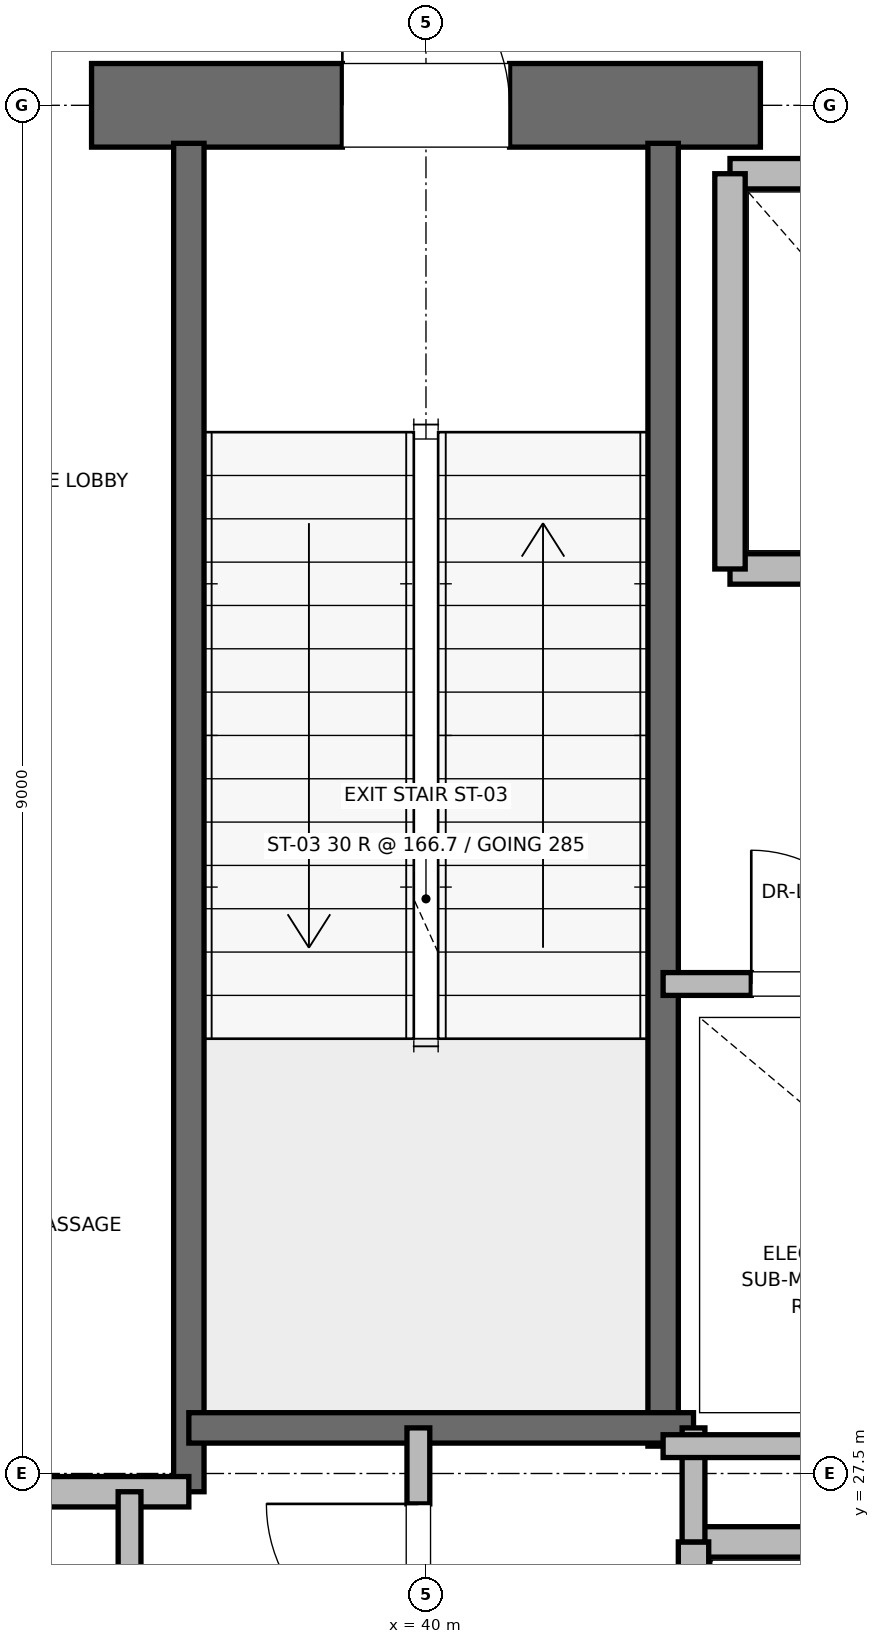
"""IFC4 building model, lengths in metres.
Left out: names, types, materials, properties, quantities, classifications, styles, units other than length and angle.
Written with IfcOpenShell. Run it as: python <this file> out.ifc"""

import sys

from ifc_helpers import new_model, si_unit, direction, frame, frame_2d, origin, place, context, subcontext, project, spatial, rectangle, extrude, element, fill, save


model = new_model("IFC4")
c1 = context("Model", 3, precision=1e-05, world=origin(), true_north=direction((0.0, 1.0)))
c2 = subcontext(c1, "Body", "Model", "MODEL_VIEW")
j1 = project(units=[si_unit("LENGTHUNIT", "METRE"), si_unit("PLANEANGLEUNIT", "RADIAN")], contexts=[c1])
p1 = place(None, origin())
s1 = spatial("IfcSite", under=j1, at=p1, CompositionType="ELEMENT")
p2 = place(p1, origin())
s2 = spatial("IfcBuilding", under=s1, at=p2, CompositionType="ELEMENT")
p3 = place(p2, frame((0.0, 0.0, 184.4)))
s3 = spatial("IfcBuildingStorey", under=s2, at=p3, CompositionType="ELEMENT", Elevation=184.4)
p4 = place(p3, frame((37.8, 36.5, 0.0), z_axis=(0.0, 0.0, 1.0), x_axis=(1.0, 0.0, 0.0)))
e1 = element("IfcWall", 1, at=p4, inside=s3, PredefinedType="SHEAR", context=c2, shape_type="SweptSolid", body=[
    extrude(rectangle(XDim=4.4, YDim=0.55, at=frame_2d((2.2, 0.0))), origin(), (0.0, 0.0, 1.0), 4.7),
])
p5 = place(p4, frame((1.65, 0.0, 0.0)))
e2 = element("IfcOpeningElement", 2, at=p5, cuts=e1, PredefinedType="OPENING", context=c2, shape_type="SweptSolid", body=[
    extrude(rectangle(XDim=1.1, YDim=2.15, at=frame_2d((0.55, 1.075))), frame((0.0, 0.275, 0.0), z_axis=(0.0, -1.0, 0.0), x_axis=(1.0, 0.0, 0.0)), (0.0, 0.0, 1.0), 0.55),
])
p6 = place(p3, frame((38.44, 27.38, 0.0), z_axis=(0.0, 0.0, 1.0), x_axis=(0.0, 1.0, 0.0)))
e3 = element("IfcWall", 3, at=p6, inside=s3, PredefinedType="SOLIDWALL", context=c2, shape_type="SweptSolid", body=[
    extrude(rectangle(XDim=8.87, YDim=0.2, at=frame_2d((4.435, 0.0))), origin(), (0.0, 0.0, 1.0), 4.7),
])
p7 = place(p3, frame((41.56, 27.68, 0.0), z_axis=(0.0, 0.0, 1.0), x_axis=(0.0, 1.0, 0.0)))
e4 = element("IfcWall", 4, at=p7, inside=s3, PredefinedType="SOLIDWALL", context=c2, shape_type="SweptSolid", body=[
    extrude(rectangle(XDim=8.57, YDim=0.2, at=frame_2d((4.285, 0.0))), origin(), (0.0, 0.0, 1.0), 4.7),
])
p8 = place(p3, frame((38.44, 27.8, 0.0), z_axis=(0.0, 0.0, 1.0), x_axis=(1.0, 0.0, 0.0)))
e5 = element("IfcWall", 5, at=p8, inside=s3, PredefinedType="SOLIDWALL", context=c2, shape_type="SweptSolid", body=[
    extrude(rectangle(XDim=3.32, YDim=0.2, at=frame_2d((1.66, 0.0))), origin(), (0.0, 0.0, 1.0), 4.7),
])
p9 = place(p3, frame((32.82, 27.38, 0.0), z_axis=(0.0, 0.0, 1.0), x_axis=(1.0, 0.0, 0.0)))
e6 = element("IfcWall", 6, at=p9, inside=s3, PredefinedType="PARTITIONING", context=c2, shape_type="SweptSolid", body=[
    extrude(rectangle(XDim=5.62, YDim=0.2, at=frame_2d((2.81, 0.0))), origin(), (0.0, 0.0, 1.0), 4.7),
])
p10 = place(p3, frame((43.44, 27.05, 0.0), z_axis=(0.0, 0.0, 1.0), x_axis=(-1.0, 0.0, 0.0)))
e7 = element("IfcWall", 7, at=p10, inside=s3, PredefinedType="SOLIDWALL", context=c2, shape_type="SweptSolid", body=[
    extrude(rectangle(XDim=1.68, YDim=0.2, at=frame_2d((0.84, 0.0))), origin(), (0.0, 0.0, 1.0), 4.7),
])
p11 = place(p3, frame((41.76, 27.05, 0.0), z_axis=(0.0, 0.0, 1.0), x_axis=(0.0, -1.0, 0.0)))
e8 = element("IfcWall", 8, at=p11, inside=s3, PredefinedType="SOLIDWALL", context=c2, shape_type="SweptSolid", body=[
    extrude(rectangle(XDim=2.6, YDim=0.2, at=frame_2d((1.3, 0.0))), origin(), (0.0, 0.0, 1.0), 4.7),
])
p12 = place(p3, frame((42.0, 33.45, 0.0), z_axis=(0.0, 0.0, 1.0), x_axis=(1.0, 0.0, 0.0)))
e9 = element("IfcWall", 9, at=p12, inside=s3, PredefinedType="SOLIDWALL", context=c2, shape_type="SweptSolid", body=[
    extrude(rectangle(XDim=2.3, YDim=0.2, at=frame_2d((1.15, 0.0))), origin(), (0.0, 0.0, 1.0), 4.7),
])
p13 = place(p3, frame((44.3, 36.05, 0.0), z_axis=(0.0, 0.0, 1.0), x_axis=(-1.0, 0.0, 0.0)))
e10 = element("IfcWall", 10, at=p13, inside=s3, PredefinedType="SOLIDWALL", context=c2, shape_type="SweptSolid", body=[
    extrude(rectangle(XDim=2.3, YDim=0.2, at=frame_2d((1.15, 0.0))), origin(), (0.0, 0.0, 1.0), 3.68),
])
p14 = place(p3, frame((42.0, 36.05, 0.0), z_axis=(0.0, 0.0, 1.0), x_axis=(0.0, -1.0, 0.0)))
e11 = element("IfcWall", 11, at=p14, inside=s3, PredefinedType="SOLIDWALL", context=c2, shape_type="SweptSolid", body=[
    extrude(rectangle(XDim=2.6, YDim=0.2, at=frame_2d((1.3, 0.0))), origin(), (0.0, 0.0, 1.0), 3.68),
])
p15 = place(p3, frame((41.76, 27.05, 0.0), z_axis=(0.0, 0.0, 1.0), x_axis=(0.0, 1.0, 0.0)))
e12 = element("IfcWall", 12, at=p15, inside=s3, PredefinedType="PARTITIONING", context=c2, shape_type="SweptSolid", body=[
    extrude(rectangle(XDim=0.75, YDim=0.15, at=frame_2d((0.375, 0.0))), origin(), (0.0, 0.0, 1.0), 2.85),
])
p16 = place(p3, frame((39.95, 25.8, 0.0), z_axis=(0.0, 0.0, 1.0), x_axis=(0.0, 1.0, 0.0)))
e13 = element("IfcWall", 13, at=p16, inside=s3, PredefinedType="PARTITIONING", context=c2, shape_type="SweptSolid", body=[
    extrude(rectangle(XDim=2.0, YDim=0.15, at=frame_2d((1.0, 0.0))), origin(), (0.0, 0.0, 1.0), 2.85),
])
p17 = place(p16, frame((0.5, 0.0, 0.0)))
e14 = element("IfcOpeningElement", 14, at=p17, cuts=e13, PredefinedType="OPENING", context=c2, shape_type="SweptSolid", body=[
    extrude(rectangle(XDim=1.0, YDim=2.15, at=frame_2d((0.5, 1.075))), frame((0.0, 0.075, 0.0), z_axis=(0.0, -1.0, 0.0), x_axis=(1.0, 0.0, 0.0)), (0.0, 0.0, 1.0), 0.15),
])
p18 = place(p3, frame((38.05, 24.5, 0.0), z_axis=(0.0, 0.0, 1.0), x_axis=(0.0, 1.0, 0.0)))
e15 = element("IfcWall", 15, at=p18, inside=s3, PredefinedType="PARTITIONING", context=c2, shape_type="SweptSolid", body=[
    extrude(rectangle(XDim=2.88, YDim=0.15, at=frame_2d((1.44, 0.0))), origin(), (0.0, 0.0, 1.0), 2.85),
])
p19 = place(p18, frame((0.94, 0.0, 0.0)))
e16 = element("IfcOpeningElement", 16, at=p19, cuts=e15, PredefinedType="OPENING", context=c2, shape_type="SweptSolid", body=[
    extrude(rectangle(XDim=1.0, YDim=2.15, at=frame_2d((0.5, 1.075))), frame((0.0, 0.075, 0.0), z_axis=(0.0, -1.0, 0.0), x_axis=(1.0, 0.0, 0.0)), (0.0, 0.0, 1.0), 0.15),
])
p20 = place(p3, frame((41.56, 27.68, 0.0), z_axis=(0.0, 0.0, 1.0), x_axis=(1.0, 0.0, 0.0)))
e17 = element("IfcWall", 17, at=p20, inside=s3, PredefinedType="PARTITIONING", context=c2, shape_type="SweptSolid", body=[
    extrude(rectangle(XDim=3.59, YDim=0.15, at=frame_2d((1.795, 0.0))), origin(), (0.0, 0.0, 1.0), 2.85),
])
p21 = place(p3, frame((41.56, 30.72, 0.0), z_axis=(0.0, 0.0, 1.0), x_axis=(1.0, 0.0, 0.0)))
e18 = element("IfcWall", 18, at=p21, inside=s3, PredefinedType="PARTITIONING", context=c2, shape_type="SweptSolid", body=[
    extrude(rectangle(XDim=2.04, YDim=0.15, at=frame_2d((1.02, 0.0))), origin(), (0.0, 0.0, 1.0), 2.85),
])
p22 = place(p21, frame((0.58, 0.0, 0.0)))
e19 = element("IfcOpeningElement", 19, at=p22, cuts=e18, PredefinedType="OPENING", context=c2, shape_type="SweptSolid", body=[
    extrude(rectangle(XDim=0.88, YDim=2.1, at=frame_2d((0.44, 1.05))), frame((0.0, 0.075, 0.0), z_axis=(0.0, -1.0, 0.0), x_axis=(1.0, 0.0, 0.0)), (0.0, 0.0, 1.0), 0.15),
])
p23 = place(p5, origin())
e20 = element("IfcDoor", 20, at=p23, inside=s3, OperationType="SINGLE_SWING_LEFT", PredefinedType="DOOR", context=c2, shape_type="SweptSolid", body=[
    extrude(rectangle(XDim=1.1, YDim=2.15, at=frame_2d((0.55, 1.075))), frame((0.0, 0.025, 0.0), z_axis=(0.0, -1.0, 0.0), x_axis=(1.0, 0.0, 0.0)), (0.0, 0.0, 1.0), 0.05),
])
fill(e2, e20)
p24 = place(p17, origin())
e21 = element("IfcDoor", 21, at=p24, inside=s3, OperationType="SINGLE_SWING_RIGHT", PredefinedType="DOOR", context=c2, shape_type="SweptSolid", body=[
    extrude(rectangle(XDim=1.0, YDim=2.15, at=frame_2d((0.5, 1.075))), frame((0.0, 0.025, 0.0), z_axis=(0.0, -1.0, 0.0), x_axis=(1.0, 0.0, 0.0)), (0.0, 0.0, 1.0), 0.05),
])
fill(e14, e21)
p25 = place(p22, origin())
e22 = element("IfcDoor", 22, at=p25, inside=s3, OperationType="SINGLE_SWING_LEFT", PredefinedType="DOOR", context=c2, shape_type="SweptSolid", body=[
    extrude(rectangle(XDim=0.88, YDim=2.1, at=frame_2d((0.44, 1.05))), frame((0.0, 0.025, 0.0), z_axis=(0.0, -1.0, 0.0), x_axis=(1.0, 0.0, 0.0)), (0.0, 0.0, 1.0), 0.05),
])
fill(e19, e22)
save(model, sys.argv[1])
